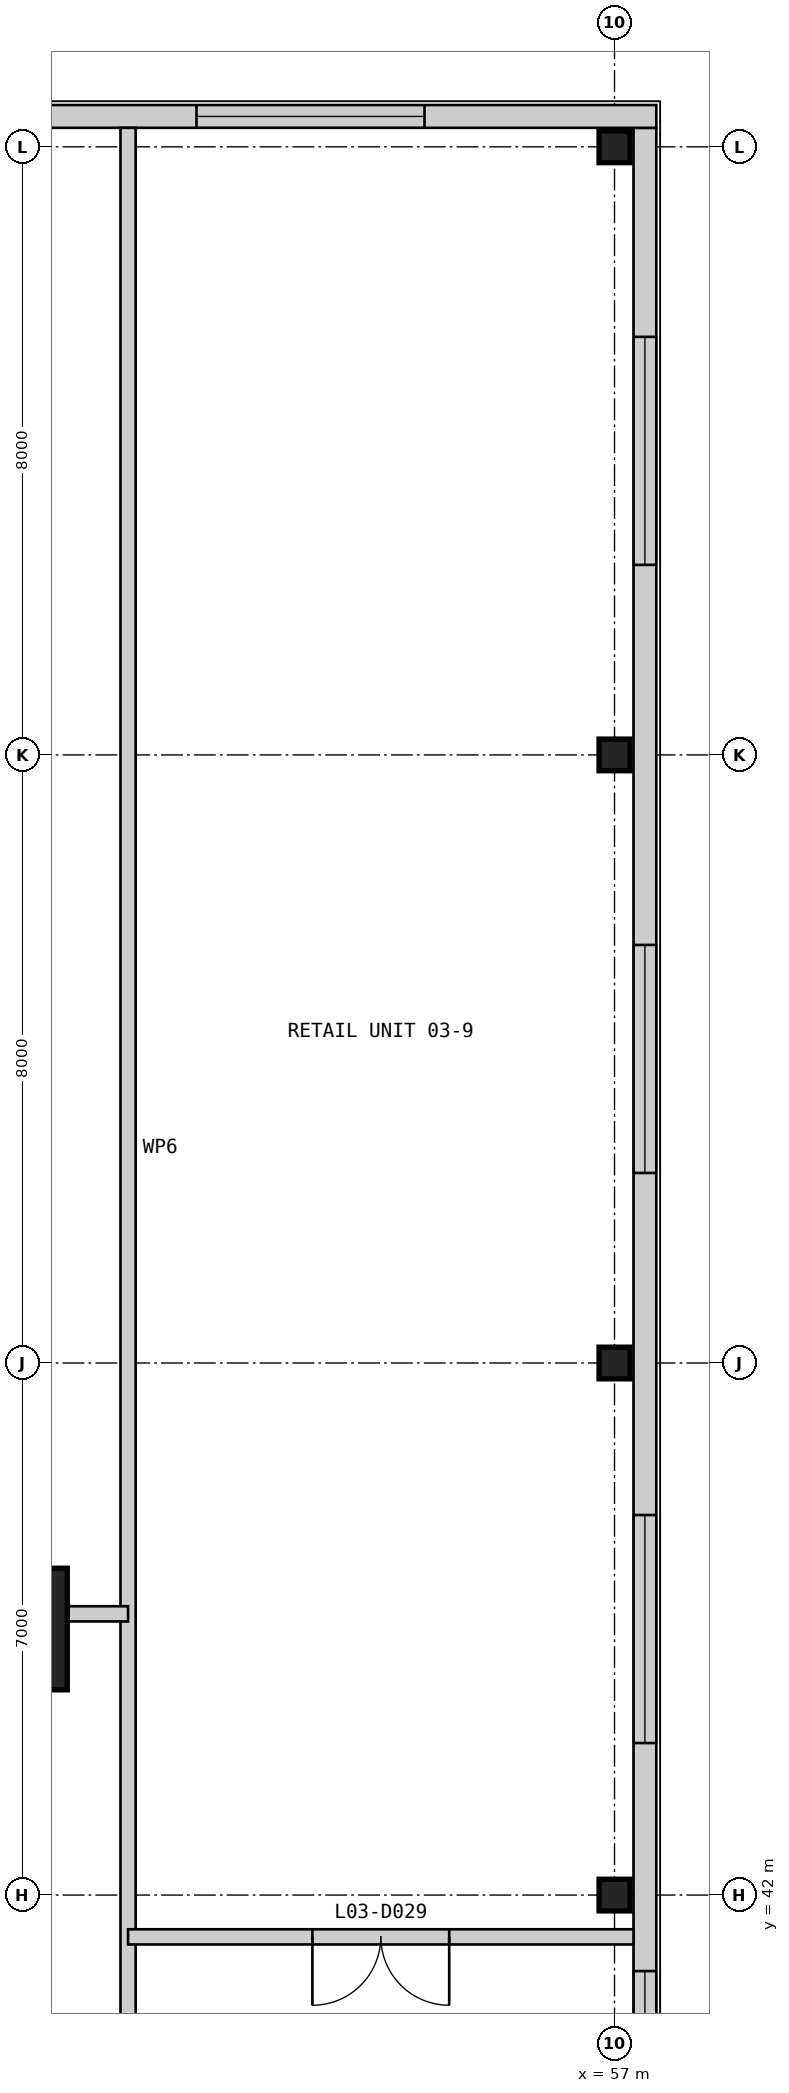
"""IFC4 building model, lengths in metres.
Left out: names, types, materials, properties, quantities, classifications, styles, units other than length and angle.
Written with IfcOpenShell. Run it as: python <this file> out.ifc"""

import sys

from ifc_helpers import new_model, si_unit, direction, frame, frame_2d, origin, origin_2d, place, context, subcontext, project, spatial, rectangle, i_section, extrude, element, fill, save


model = new_model("IFC4")
c1 = context("Model", 3, precision=1e-05, world=origin(), true_north=direction((0.0, 1.0)))
c2 = subcontext(c1, "Body", "Model", "MODEL_VIEW")
j1 = project(units=[si_unit("LENGTHUNIT", "METRE"), si_unit("PLANEANGLEUNIT", "RADIAN")], contexts=[c1])
p1 = place(None, origin())
s1 = spatial("IfcSite", under=j1, at=p1, CompositionType="ELEMENT")
p2 = place(p1, origin())
s2 = spatial("IfcBuilding", under=s1, at=p2, CompositionType="ELEMENT")
p3 = place(p2, frame((0.0, 0.0, 16.6)))
s3 = spatial("IfcBuildingStorey", under=s2, at=p3, CompositionType="ELEMENT", Elevation=16.6)
p4 = place(p3, frame((49.0, 45.5, 0.0), z_axis=(0.0, 0.0, 1.0), x_axis=(1.0, 0.0, 0.0)))
e1 = element("IfcColumn", 1, at=p4, inside=s3, PredefinedType="COLUMN", context=c2, shape_type="SweptSolid", body=[
    extrude(rectangle(XDim=1.6, YDim=1.6, at=origin_2d()), origin(), (0.0, 0.0, 1.0), 4.8),
])
for number, where, z_axis, x_axis in (
    (2, (57.0, 42.0, 0.0), (0.0, 0.0, 1.0), (1.0, 0.0, 0.0)),
    (3, (57.0, 49.0, 0.0), (0.0, 0.0, 1.0), (1.0, 0.0, 0.0)),
    (4, (57.0, 57.0, 0.0), (0.0, 0.0, 1.0), (1.0, 0.0, 0.0)),
    (5, (57.0, 65.0, 0.0), (0.0, 0.0, 1.0), (1.0, 0.0, 0.0)),
):
    element("IfcColumn", number, at=place(p3, frame(where, z_axis=z_axis, x_axis=x_axis)), inside=s3, PredefinedType="COLUMN", context=c2, shape_type="SweptSolid", body=[
        extrude(i_section(OverallWidth=0.406, OverallDepth=0.417, WebThickness=0.03, FlangeThickness=0.048, at=origin_2d()), origin(), (0.0, 0.0, 1.0), 4.8),
    ])
p5 = place(p3, frame((57.4, -7.25, 0.0), z_axis=(0.0, 0.0, 1.0), x_axis=(0.0, 1.0, 0.0)))
e6 = element("IfcWall", 6, at=p5, inside=s3, PredefinedType="SOLIDWALL", context=c2, shape_type="SweptSolid", body=[
    extrude(rectangle(XDim=72.5, YDim=0.3, at=frame_2d((36.25, 0.0))), origin(), (0.0, 0.0, 1.0), 4.5),
])
p6 = place(p5, frame((2.75, 0.0, 0.9)))
e7 = element("IfcOpeningElement", 7, at=p6, cuts=e6, PredefinedType="OPENING", context=c2, shape_type="SweptSolid", body=[
    extrude(rectangle(XDim=3.0, YDim=2.4, at=frame_2d((1.5, 1.2))), frame((0.0, 0.16, 0.0), z_axis=(0.0, -1.0, 0.0), x_axis=(1.0, 0.0, 0.0)), (0.0, 0.0, 1.0), 0.32),
])
p7 = place(p5, frame((10.75, 0.0, 0.9)))
e8 = element("IfcOpeningElement", 8, at=p7, cuts=e6, PredefinedType="OPENING", context=c2, shape_type="SweptSolid", body=[
    extrude(rectangle(XDim=3.0, YDim=2.4, at=frame_2d((1.5, 1.2))), frame((0.0, 0.16, 0.0), z_axis=(0.0, -1.0, 0.0), x_axis=(1.0, 0.0, 0.0)), (0.0, 0.0, 1.0), 0.32),
])
p8 = place(p5, frame((24.75, 0.0, 0.9)))
e9 = element("IfcOpeningElement", 9, at=p8, cuts=e6, PredefinedType="OPENING", context=c2, shape_type="SweptSolid", body=[
    extrude(rectangle(XDim=3.0, YDim=2.4, at=frame_2d((1.5, 1.2))), frame((0.0, 0.16, 0.0), z_axis=(0.0, -1.0, 0.0), x_axis=(1.0, 0.0, 0.0)), (0.0, 0.0, 1.0), 0.32),
])
p9 = place(p5, frame((36.75, 0.0, 0.9)))
e10 = element("IfcOpeningElement", 10, at=p9, cuts=e6, PredefinedType="OPENING", context=c2, shape_type="SweptSolid", body=[
    extrude(rectangle(XDim=3.0, YDim=2.4, at=frame_2d((1.5, 1.2))), frame((0.0, 0.16, 0.0), z_axis=(0.0, -1.0, 0.0), x_axis=(1.0, 0.0, 0.0)), (0.0, 0.0, 1.0), 0.32),
])
p10 = place(p5, frame((45.25, 0.0, 0.9)))
e11 = element("IfcOpeningElement", 11, at=p10, cuts=e6, PredefinedType="OPENING", context=c2, shape_type="SweptSolid", body=[
    extrude(rectangle(XDim=3.0, YDim=2.4, at=frame_2d((1.5, 1.2))), frame((0.0, 0.16, 0.0), z_axis=(0.0, -1.0, 0.0), x_axis=(1.0, 0.0, 0.0)), (0.0, 0.0, 1.0), 0.32),
])
p11 = place(p5, frame((51.25, 0.0, 0.9)))
e12 = element("IfcOpeningElement", 12, at=p11, cuts=e6, PredefinedType="OPENING", context=c2, shape_type="SweptSolid", body=[
    extrude(rectangle(XDim=3.0, YDim=2.4, at=frame_2d((1.5, 1.2))), frame((0.0, 0.16, 0.0), z_axis=(0.0, -1.0, 0.0), x_axis=(1.0, 0.0, 0.0)), (0.0, 0.0, 1.0), 0.32),
])
p12 = place(p5, frame((58.75, 0.0, 0.9)))
e13 = element("IfcOpeningElement", 13, at=p12, cuts=e6, PredefinedType="OPENING", context=c2, shape_type="SweptSolid", body=[
    extrude(rectangle(XDim=3.0, YDim=2.4, at=frame_2d((1.5, 1.2))), frame((0.0, 0.16, 0.0), z_axis=(0.0, -1.0, 0.0), x_axis=(1.0, 0.0, 0.0)), (0.0, 0.0, 1.0), 0.32),
])
p13 = place(p5, frame((66.75, 0.0, 0.9)))
e14 = element("IfcOpeningElement", 14, at=p13, cuts=e6, PredefinedType="OPENING", context=c2, shape_type="SweptSolid", body=[
    extrude(rectangle(XDim=3.0, YDim=2.4, at=frame_2d((1.5, 1.2))), frame((0.0, 0.16, 0.0), z_axis=(0.0, -1.0, 0.0), x_axis=(1.0, 0.0, 0.0)), (0.0, 0.0, 1.0), 0.32),
])
p14 = place(p3, frame((57.55, 65.4, 0.0), z_axis=(0.0, 0.0, 1.0), x_axis=(-1.0, 0.0, 0.0)))
e15 = element("IfcWall", 15, at=p14, inside=s3, PredefinedType="SOLIDWALL", context=c2, shape_type="SweptSolid", body=[
    extrude(rectangle(XDim=73.1, YDim=0.3, at=frame_2d((36.55, 0.0))), origin(), (0.0, 0.0, 1.0), 4.5),
])
p15 = place(p14, frame((67.05, 0.0, 0.9)))
e16 = element("IfcOpeningElement", 16, at=p15, cuts=e15, PredefinedType="OPENING", context=c2, shape_type="SweptSolid", body=[
    extrude(rectangle(XDim=3.0, YDim=2.4, at=frame_2d((1.5, 1.2))), frame((0.0, 0.16, 0.0), z_axis=(0.0, -1.0, 0.0), x_axis=(1.0, 0.0, 0.0)), (0.0, 0.0, 1.0), 0.32),
])
p16 = place(p14, frame((59.05, 0.0, 0.9)))
e17 = element("IfcOpeningElement", 17, at=p16, cuts=e15, PredefinedType="OPENING", context=c2, shape_type="SweptSolid", body=[
    extrude(rectangle(XDim=3.0, YDim=2.4, at=frame_2d((1.5, 1.2))), frame((0.0, 0.16, 0.0), z_axis=(0.0, -1.0, 0.0), x_axis=(1.0, 0.0, 0.0)), (0.0, 0.0, 1.0), 0.32),
])
p17 = place(p14, frame((51.05, 0.0, 0.9)))
e18 = element("IfcOpeningElement", 18, at=p17, cuts=e15, PredefinedType="OPENING", context=c2, shape_type="SweptSolid", body=[
    extrude(rectangle(XDim=3.0, YDim=2.4, at=frame_2d((1.5, 1.2))), frame((0.0, 0.16, 0.0), z_axis=(0.0, -1.0, 0.0), x_axis=(1.0, 0.0, 0.0)), (0.0, 0.0, 1.0), 0.32),
])
p18 = place(p14, frame((37.05, 0.0, 0.9)))
e19 = element("IfcOpeningElement", 19, at=p18, cuts=e15, PredefinedType="OPENING", context=c2, shape_type="SweptSolid", body=[
    extrude(rectangle(XDim=3.0, YDim=2.4, at=frame_2d((1.5, 1.2))), frame((0.0, 0.16, 0.0), z_axis=(0.0, -1.0, 0.0), x_axis=(1.0, 0.0, 0.0)), (0.0, 0.0, 1.0), 0.32),
])
p19 = place(p14, frame((25.05, 0.0, 0.9)))
e20 = element("IfcOpeningElement", 20, at=p19, cuts=e15, PredefinedType="OPENING", context=c2, shape_type="SweptSolid", body=[
    extrude(rectangle(XDim=3.0, YDim=2.4, at=frame_2d((1.5, 1.2))), frame((0.0, 0.16, 0.0), z_axis=(0.0, -1.0, 0.0), x_axis=(1.0, 0.0, 0.0)), (0.0, 0.0, 1.0), 0.32),
])
p20 = place(p14, frame((16.55, 0.0, 0.9)))
e21 = element("IfcOpeningElement", 21, at=p20, cuts=e15, PredefinedType="OPENING", context=c2, shape_type="SweptSolid", body=[
    extrude(rectangle(XDim=3.0, YDim=2.4, at=frame_2d((1.5, 1.2))), frame((0.0, 0.16, 0.0), z_axis=(0.0, -1.0, 0.0), x_axis=(1.0, 0.0, 0.0)), (0.0, 0.0, 1.0), 0.32),
])
p21 = place(p14, frame((10.55, 0.0, 0.9)))
e22 = element("IfcOpeningElement", 22, at=p21, cuts=e15, PredefinedType="OPENING", context=c2, shape_type="SweptSolid", body=[
    extrude(rectangle(XDim=3.0, YDim=2.4, at=frame_2d((1.5, 1.2))), frame((0.0, 0.16, 0.0), z_axis=(0.0, -1.0, 0.0), x_axis=(1.0, 0.0, 0.0)), (0.0, 0.0, 1.0), 0.32),
])
p22 = place(p14, frame((3.05, 0.0, 0.9)))
e23 = element("IfcOpeningElement", 23, at=p22, cuts=e15, PredefinedType="OPENING", context=c2, shape_type="SweptSolid", body=[
    extrude(rectangle(XDim=3.0, YDim=2.4, at=frame_2d((1.5, 1.2))), frame((0.0, 0.16, 0.0), z_axis=(0.0, -1.0, 0.0), x_axis=(1.0, 0.0, 0.0)), (0.0, 0.0, 1.0), 0.32),
])
p23 = place(p3, frame((50.6, 38.4, 0.0), z_axis=(0.0, 0.0, 1.0), x_axis=(0.0, 1.0, 0.0)))
e24 = element("IfcWall", 24, at=p23, inside=s3, PredefinedType="PARTITIONING", context=c2, shape_type="SweptSolid", body=[
    extrude(rectangle(XDim=26.85, YDim=0.2, at=frame_2d((13.425, 0.0))), origin(), (0.0, 0.0, 1.0), 4.5),
])
p24 = place(p3, frame((50.6, 41.45, 0.0), z_axis=(0.0, 0.0, 1.0), x_axis=(1.0, 0.0, 0.0)))
e25 = element("IfcWall", 25, at=p24, inside=s3, PredefinedType="PARTITIONING", context=c2, shape_type="SweptSolid", body=[
    extrude(rectangle(XDim=6.65, YDim=0.2, at=frame_2d((3.325, 0.0))), origin(), (0.0, 0.0, 1.0), 4.5),
])
p25 = place(p24, frame((2.425, 0.0, 0.0)))
e26 = element("IfcOpeningElement", 26, at=p25, cuts=e25, PredefinedType="OPENING", context=c2, shape_type="SweptSolid", body=[
    extrude(rectangle(XDim=1.8, YDim=2.4, at=frame_2d((0.9, 1.2))), frame((0.0, 0.11, 0.0), z_axis=(0.0, -1.0, 0.0), x_axis=(1.0, 0.0, 0.0)), (0.0, 0.0, 1.0), 0.22),
])
p26 = place(p3, frame((49.8, 45.7, 0.0), z_axis=(0.0, 0.0, 1.0), x_axis=(1.0, 0.0, 0.0)))
e27 = element("IfcWall", 27, at=p26, inside=s3, PredefinedType="PARTITIONING", context=c2, shape_type="SweptSolid", body=[
    extrude(rectangle(XDim=0.8, YDim=0.2, at=frame_2d((0.4, 0.0))), origin(), (0.0, 0.0, 1.0), 4.5),
])
p27 = place(p10, origin())
e28 = element("IfcWindow", 28, at=p27, inside=s3, PartitioningType="SINGLE_PANEL", PredefinedType="WINDOW", context=c2, shape_type="SweptSolid", body=[
    extrude(rectangle(XDim=3.0, YDim=2.4, at=frame_2d((1.5, 1.2))), frame((0.0, 0.03, 0.0), z_axis=(0.0, -1.0, 0.0), x_axis=(1.0, 0.0, 0.0)), (0.0, 0.0, 1.0), 0.06),
])
fill(e11, e28)
p28 = place(p11, origin())
e29 = element("IfcWindow", 29, at=p28, inside=s3, PartitioningType="SINGLE_PANEL", PredefinedType="WINDOW", context=c2, shape_type="SweptSolid", body=[
    extrude(rectangle(XDim=3.0, YDim=2.4, at=frame_2d((1.5, 1.2))), frame((0.0, 0.03, 0.0), z_axis=(0.0, -1.0, 0.0), x_axis=(1.0, 0.0, 0.0)), (0.0, 0.0, 1.0), 0.06),
])
fill(e12, e29)
p29 = place(p12, origin())
e30 = element("IfcWindow", 30, at=p29, inside=s3, PartitioningType="SINGLE_PANEL", PredefinedType="WINDOW", context=c2, shape_type="SweptSolid", body=[
    extrude(rectangle(XDim=3.0, YDim=2.4, at=frame_2d((1.5, 1.2))), frame((0.0, 0.03, 0.0), z_axis=(0.0, -1.0, 0.0), x_axis=(1.0, 0.0, 0.0)), (0.0, 0.0, 1.0), 0.06),
])
fill(e13, e30)
p30 = place(p13, origin())
e31 = element("IfcWindow", 31, at=p30, inside=s3, PartitioningType="SINGLE_PANEL", PredefinedType="WINDOW", context=c2, shape_type="SweptSolid", body=[
    extrude(rectangle(XDim=3.0, YDim=2.4, at=frame_2d((1.5, 1.2))), frame((0.0, 0.03, 0.0), z_axis=(0.0, -1.0, 0.0), x_axis=(1.0, 0.0, 0.0)), (0.0, 0.0, 1.0), 0.06),
])
fill(e14, e31)
p31 = place(p22, origin())
e32 = element("IfcWindow", 32, at=p31, inside=s3, PartitioningType="SINGLE_PANEL", PredefinedType="WINDOW", context=c2, shape_type="SweptSolid", body=[
    extrude(rectangle(XDim=3.0, YDim=2.4, at=frame_2d((1.5, 1.2))), frame((0.0, 0.03, 0.0), z_axis=(0.0, -1.0, 0.0), x_axis=(1.0, 0.0, 0.0)), (0.0, 0.0, 1.0), 0.06),
])
fill(e23, e32)
p32 = place(p25, frame((1.8, 0.0, 0.0), z_axis=(0.0, 0.0, 1.0), x_axis=(-1.0, 0.0, 0.0)))
e33 = element("IfcDoor", 33, at=p32, inside=s3, OperationType="DOUBLE_DOOR_SINGLE_SWING", PredefinedType="DOOR", context=c2, shape_type="SweptSolid", body=[
    extrude(rectangle(XDim=1.8, YDim=2.4, at=frame_2d((0.9, 1.2))), frame((0.0, 0.025, 0.0), z_axis=(0.0, -1.0, 0.0), x_axis=(1.0, 0.0, 0.0)), (0.0, 0.0, 1.0), 0.05),
])
fill(e26, e33)
save(model, sys.argv[1])
